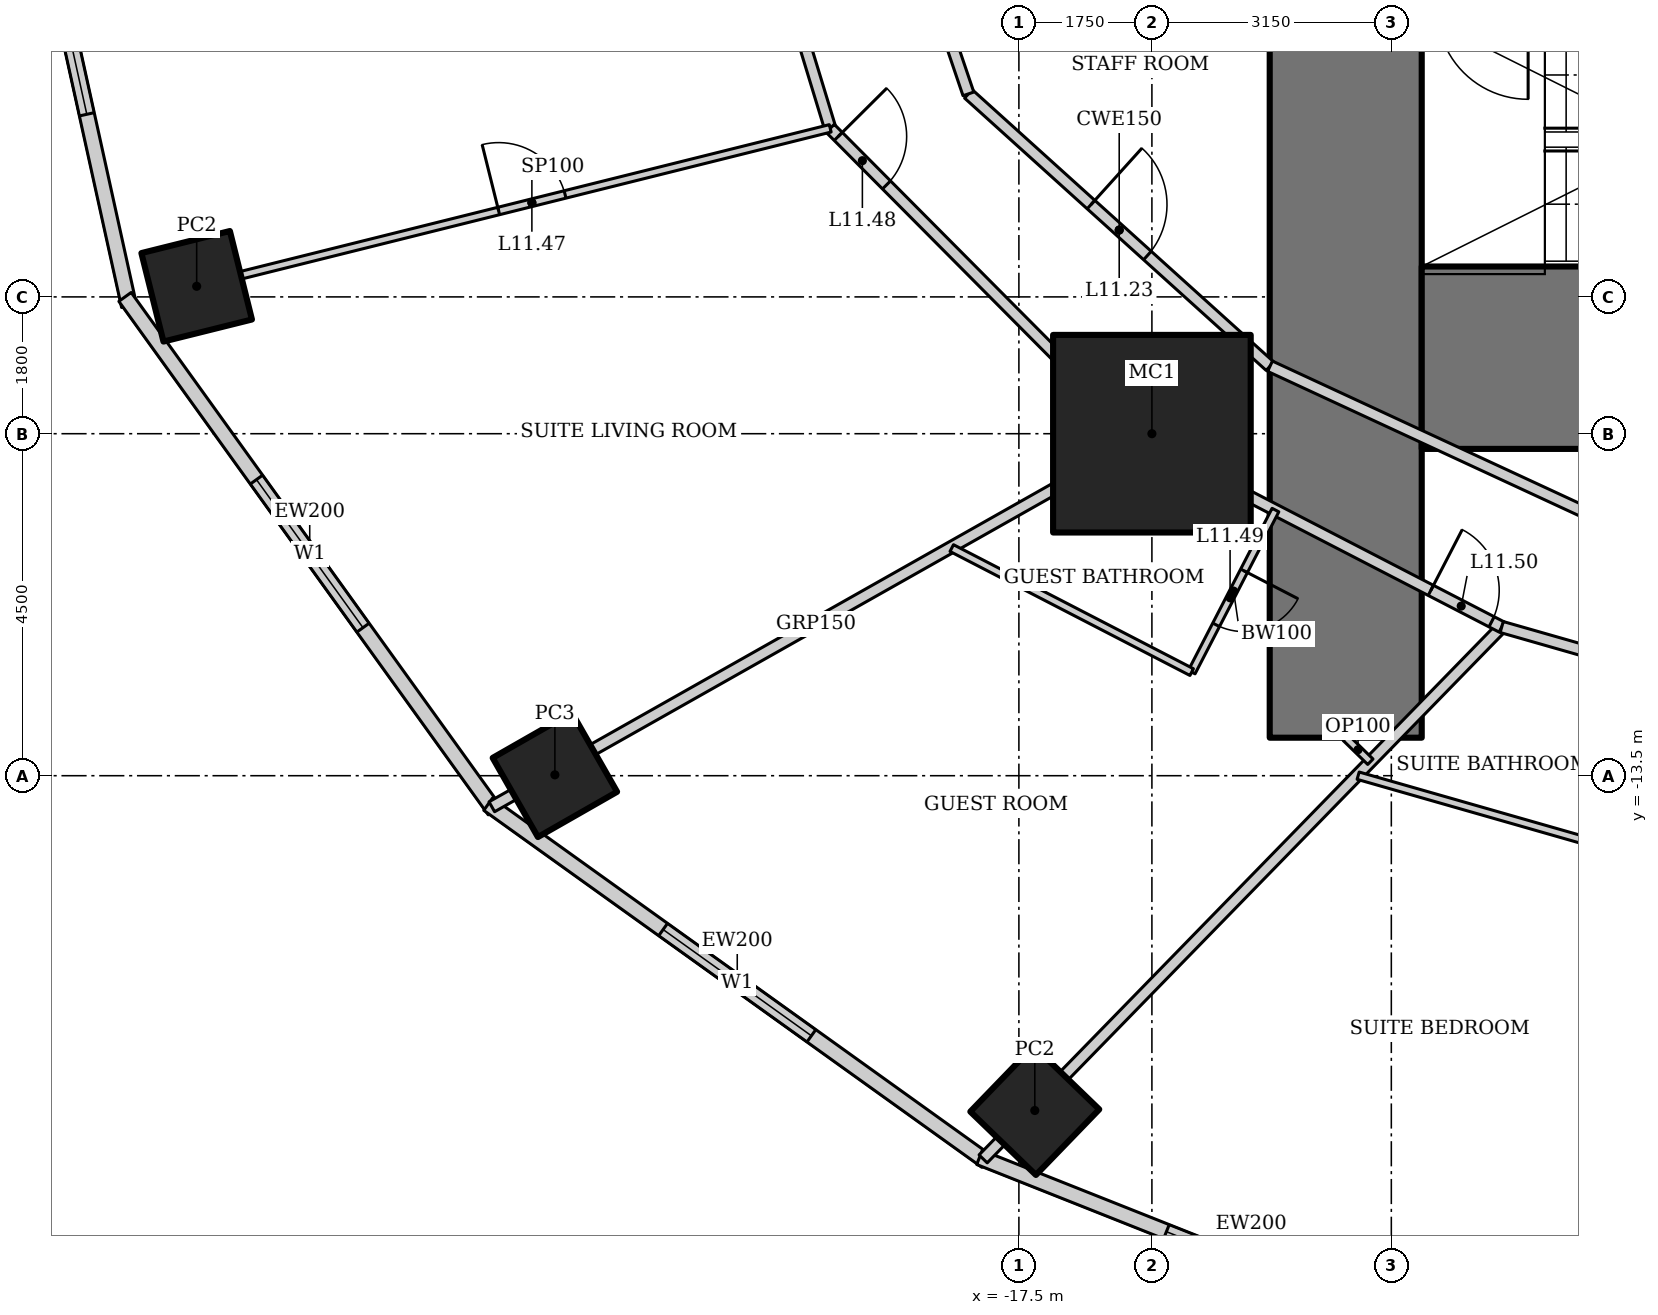
"""IFC4 building model, lengths in metres.
Left out: names, types, materials, properties, quantities, classifications, styles, units other than length and angle.
Written with IfcOpenShell. Run it as: python <this file> out.ifc"""

import sys

from ifc_helpers import new_model, si_unit, direction, frame, frame_2d, origin, origin_2d, place, context, subcontext, project, spatial, rectangle, hollow_rectangle, extrude, element, fill, save


model = new_model("IFC4")
c1 = context("Model", 3, precision=1e-05, world=origin(), true_north=direction((0.0, 1.0)))
c2 = subcontext(c1, "Body", "Model", "MODEL_VIEW")
j1 = project(units=[si_unit("LENGTHUNIT", "METRE"), si_unit("PLANEANGLEUNIT", "RADIAN")], contexts=[c1])
p1 = place(None, origin())
s1 = spatial("IfcSite", under=j1, at=p1, CompositionType="ELEMENT")
p2 = place(p1, origin())
s2 = spatial("IfcBuilding", under=s1, at=p2, CompositionType="ELEMENT")
p3 = place(p2, frame((0.0, 0.0, 55.0)))
s3 = spatial("IfcBuildingStorey", under=s2, at=p3, CompositionType="ELEMENT", Elevation=55.0)
p4 = place(p3, frame((-15.75, -9.0, 0.0), z_axis=(0.0, 0.0, 1.0), x_axis=(1.0, 0.0, 0.0)))
e1 = element("IfcColumn", 1, at=p4, inside=s3, PredefinedType="COLUMN", context=c2, shape_type="SweptSolid", body=[
    extrude(hollow_rectangle(XDim=2.6, YDim=2.6, WallThickness=0.13, at=origin_2d()), origin(), (0.0, 0.0, 1.0), 3.6),
])
p5 = place(p3, frame((-28.318, -7.06, 0.0), z_axis=(0.0, 0.0, 1.0), x_axis=(0.970295726276, 0.2419218956, 0.0)))
e2 = element("IfcColumn", 2, at=p5, inside=s3, PredefinedType="COLUMN", context=c2, shape_type="SweptSolid", body=[
    extrude(hollow_rectangle(XDim=1.2, YDim=1.2, WallThickness=0.1, at=origin_2d()), origin(), (0.0, 0.0, 1.0), 3.6),
])
p6 = place(p3, frame((-23.605, -13.489, 0.0), z_axis=(0.0, 0.0, 1.0), x_axis=(0.86824298017, 0.496139221777, 0.0)))
e3 = element("IfcColumn", 3, at=p6, inside=s3, PredefinedType="COLUMN", context=c2, shape_type="SweptSolid", body=[
    extrude(hollow_rectangle(XDim=1.2, YDim=1.2, WallThickness=0.12, at=origin_2d()), origin(), (0.0, 0.0, 1.0), 3.6),
])
p7 = place(p3, frame((-17.291, -17.905, 0.0), z_axis=(0.0, 0.0, 1.0), x_axis=(0.694658370459, 0.719339800339, 0.0)))
e4 = element("IfcColumn", 4, at=p7, inside=s3, PredefinedType="COLUMN", context=c2, shape_type="SweptSolid", body=[
    extrude(hollow_rectangle(XDim=1.2, YDim=1.2, WallThickness=0.1, at=origin_2d()), origin(), (0.0, 0.0, 1.0), 3.6),
])
p8 = place(p3, frame((-13.2, 13.0, 0.0), z_axis=(0.0, 0.0, 1.0), x_axis=(0.0, -1.0, 0.0)))
e5 = element("IfcWall", 5, at=p8, inside=s3, PredefinedType="SHEAR", context=c2, shape_type="SweptSolid", body=[
    extrude(rectangle(XDim=26.0, YDim=2.0, at=frame_2d((13.0, 0.0))), origin(), (0.0, 0.0, 1.0), 3.6),
])
p9 = place(p8, frame((12.1, 0.0, 0.0)))
e6 = element("IfcOpeningElement", 6, at=p9, cuts=e5, PredefinedType="OPENING", context=c2, shape_type="SweptSolid", body=[
    extrude(rectangle(XDim=1.8, YDim=2.1, at=frame_2d((0.9, 1.05))), frame((0.0, 1.01, 0.0), z_axis=(0.0, -1.0, 0.0), x_axis=(1.0, 0.0, 0.0)), (0.0, 0.0, 1.0), 2.02),
])
p10 = place(p3, frame((-12.2, -8.0, 0.0), z_axis=(0.0, 0.0, 1.0), x_axis=(1.0, 0.0, 0.0)))
e7 = element("IfcWall", 7, at=p10, inside=s3, PredefinedType="SHEAR", context=c2, shape_type="SweptSolid", body=[
    extrude(rectangle(XDim=24.4, YDim=2.4, at=frame_2d((12.2, 0.0))), origin(), (0.0, 0.0, 1.0), 3.6),
])
p11 = place(p3, frame((-30.835, 0.067, 0.0), z_axis=(0.0, 0.0, 1.0), x_axis=(0.215238065514, -0.976561608478, 0.0)))
e8 = element("IfcWall", 8, at=p11, inside=s3, PredefinedType="SOLIDWALL", context=c2, shape_type="SweptSolid", body=[
    extrude(rectangle(XDim=7.562, YDim=0.2, at=frame_2d((3.781, 0.0))), origin(), (0.0, 0.0, 1.0), 3.45),
])
p12 = place(p11, frame((2.581, 0.0, 0.5)))
e9 = element("IfcOpeningElement", 9, at=p12, cuts=e8, PredefinedType="OPENING", context=c2, shape_type="SweptSolid", body=[
    extrude(rectangle(XDim=2.4, YDim=2.2, at=frame_2d((1.2, 1.1))), frame((0.0, 0.11, 0.0), z_axis=(0.0, -1.0, 0.0), x_axis=(1.0, 0.0, 0.0)), (0.0, 0.0, 1.0), 0.22),
])
p13 = place(p3, frame((-29.26, -7.2, 0.0), z_axis=(0.0, 0.0, 1.0), x_axis=(0.583937613703, -0.811798536155, 0.0)))
e10 = element("IfcWall", 10, at=p13, inside=s3, PredefinedType="SOLIDWALL", context=c2, shape_type="SweptSolid", body=[
    extrude(rectangle(XDim=8.323, YDim=0.2, at=frame_2d((4.162, 0.0))), origin(), (0.0, 0.0, 1.0), 3.45),
])
p14 = place(p13, frame((2.961, 0.0, 0.5)))
e11 = element("IfcOpeningElement", 11, at=p14, cuts=e10, PredefinedType="OPENING", context=c2, shape_type="SweptSolid", body=[
    extrude(rectangle(XDim=2.4, YDim=2.2, at=frame_2d((1.2, 1.1))), frame((0.0, 0.11, 0.0), z_axis=(0.0, -1.0, 0.0), x_axis=(1.0, 0.0, 0.0)), (0.0, 0.0, 1.0), 0.22),
])
p15 = place(p3, frame((-24.482, -13.875, 0.0), z_axis=(0.0, 0.0, 1.0), x_axis=(0.812791321576, -0.582554948112, 0.0)))
e12 = element("IfcWall", 12, at=p15, inside=s3, PredefinedType="SOLIDWALL", context=c2, shape_type="SweptSolid", body=[
    extrude(rectangle(XDim=8.063, YDim=0.2, at=frame_2d((4.032, 0.0))), origin(), (0.0, 0.0, 1.0), 3.45),
])
p16 = place(p15, frame((2.832, 0.0, 0.5)))
e13 = element("IfcOpeningElement", 13, at=p16, cuts=e12, PredefinedType="OPENING", context=c2, shape_type="SweptSolid", body=[
    extrude(rectangle(XDim=2.4, YDim=2.2, at=frame_2d((1.2, 1.1))), frame((0.0, 0.11, 0.0), z_axis=(0.0, -1.0, 0.0), x_axis=(1.0, 0.0, 0.0)), (0.0, 0.0, 1.0), 0.22),
])
p17 = place(p3, frame((-18.018, -18.523, 0.0), z_axis=(0.0, 0.0, 1.0), x_axis=(0.929358351251, -0.369178892895, 0.0)))
e14 = element("IfcWall", 14, at=p17, inside=s3, PredefinedType="SOLIDWALL", context=c2, shape_type="SweptSolid", body=[
    extrude(rectangle(XDim=7.692, YDim=0.2, at=frame_2d((3.846, 0.0))), origin(), (0.0, 0.0, 1.0), 3.45),
])
p18 = place(p17, frame((2.646, 0.0, 0.5)))
e15 = element("IfcOpeningElement", 15, at=p18, cuts=e14, PredefinedType="OPENING", context=c2, shape_type="SweptSolid", body=[
    extrude(rectangle(XDim=2.4, YDim=2.2, at=frame_2d((1.2, 1.1))), frame((0.0, 0.11, 0.0), z_axis=(0.0, -1.0, 0.0), x_axis=(1.0, 0.0, 0.0)), (0.0, 0.0, 1.0), 0.22),
])
p19 = place(p3, frame((-24.435, -13.909, 0.0), z_axis=(0.0, 0.0, 1.0), x_axis=(0.870612006791, 0.491970256856, 0.0)))
e16 = element("IfcWall", 16, at=p19, inside=s3, PredefinedType="PARTITIONING", context=c2, shape_type="SweptSolid", body=[
    extrude(rectangle(XDim=9.802, YDim=0.15, at=frame_2d((4.901, 0.0))), origin(), (0.0, 0.0, 1.0), 2.693),
])
p20 = place(p3, frame((-17.97, -18.542, 0.0), z_axis=(0.0, 0.0, 1.0), x_axis=(0.698095013805, 0.71600513385, 0.0)))
e17 = element("IfcWall", 17, at=p20, inside=s3, PredefinedType="PARTITIONING", context=c2, shape_type="SweptSolid", body=[
    extrude(rectangle(XDim=9.774, YDim=0.15, at=frame_2d((4.887, 0.0))), origin(), (0.0, 0.0, 1.0), 2.528),
])
p21 = place(p3, frame((-21.5, 0.0, 0.0), z_axis=(0.0, 0.0, 1.0), x_axis=(0.291383581394, -0.95660629754, 0.0)))
e18 = element("IfcWall", 18, at=p21, inside=s3, PredefinedType="PARTITIONING", context=c2, shape_type="SweptSolid", body=[
    extrude(rectangle(XDim=5.208, YDim=0.15, at=frame_2d((2.604, 0.0))), origin(), (0.0, 0.0, 1.0), 3.45),
])
p22 = place(p3, frame((-19.982, -4.982, 0.0), z_axis=(0.0, 0.0, 1.0), x_axis=(0.705121546414, -0.709086457904, 0.0)))
e19 = element("IfcWall", 19, at=p22, inside=s3, PredefinedType="PARTITIONING", context=c2, shape_type="SweptSolid", body=[
    extrude(rectangle(XDim=5.788, YDim=0.15, at=frame_2d((2.894, 0.0))), origin(), (0.0, 0.0, 1.0), 3.45),
])
p23 = place(p22, frame((0.15, 0.0, 0.0)))
e20 = element("IfcOpeningElement", 20, at=p23, cuts=e19, PredefinedType="OPENING", context=c2, shape_type="SweptSolid", body=[
    extrude(rectangle(XDim=0.9, YDim=2.1, at=frame_2d((0.45, 1.05))), frame((0.0, 0.085, 0.0), z_axis=(0.0, -1.0, 0.0), x_axis=(1.0, 0.0, 0.0)), (0.0, 0.0, 1.0), 0.17),
])
p24 = place(p3, frame((-15.901, -9.086, 0.0), z_axis=(0.0, 0.0, 1.0), x_axis=(0.888333171507, -0.459199495209, 0.0)))
e21 = element("IfcWall", 21, at=p24, inside=s3, PredefinedType="PARTITIONING", context=c2, shape_type="SweptSolid", body=[
    extrude(rectangle(XDim=5.351, YDim=0.15, at=frame_2d((2.676, 0.0))), origin(), (0.0, 0.0, 1.0), 3.45),
])
p25 = place(p24, frame((4.301, 0.0, 0.0)))
e22 = element("IfcOpeningElement", 22, at=p25, cuts=e21, PredefinedType="OPENING", context=c2, shape_type="SweptSolid", body=[
    extrude(rectangle(XDim=0.9, YDim=2.1, at=frame_2d((0.45, 1.05))), frame((0.0, 0.085, 0.0), z_axis=(0.0, -1.0, 0.0), x_axis=(1.0, 0.0, 0.0)), (0.0, 0.0, 1.0), 0.17),
])
p26 = place(p3, frame((-11.147, -11.544, 0.0), z_axis=(0.0, 0.0, 1.0), x_axis=(0.961464178199, -0.27493023486, 0.0)))
e23 = element("IfcWall", 23, at=p26, inside=s3, PredefinedType="PARTITIONING", context=c2, shape_type="SweptSolid", body=[
    extrude(rectangle(XDim=4.78, YDim=0.15, at=frame_2d((2.39, 0.0))), origin(), (0.0, 0.0, 1.0), 3.45),
])
p27 = place(p3, frame((-18.164, -4.529, 0.0), z_axis=(0.0, 0.0, 1.0), x_axis=(0.742194222, -0.670184852731, 0.0)))
e24 = element("IfcWall", 24, at=p27, inside=s3, PredefinedType="PARTITIONING", context=c2, shape_type="SweptSolid", body=[
    extrude(rectangle(XDim=5.347, YDim=0.15, at=frame_2d((2.673, 0.0))), origin(), (0.0, 0.0, 1.0), 3.45),
])
p28 = place(p27, frame((2.173, 0.0, 0.0)))
e25 = element("IfcOpeningElement", 25, at=p28, cuts=e24, PredefinedType="OPENING", context=c2, shape_type="SweptSolid", body=[
    extrude(rectangle(XDim=1.0, YDim=2.1, at=frame_2d((0.5, 1.05))), frame((0.0, 0.085, 0.0), z_axis=(0.0, -1.0, 0.0), x_axis=(1.0, 0.0, 0.0)), (0.0, 0.0, 1.0), 0.17),
])
p29 = place(p3, frame((-14.196, -8.112, 0.0), z_axis=(0.0, 0.0, 1.0), x_axis=(0.907279653965, -0.420527798727, 0.0)))
e26 = element("IfcWall", 26, at=p29, inside=s3, PredefinedType="PARTITIONING", context=c2, shape_type="SweptSolid", body=[
    extrude(rectangle(XDim=4.844, YDim=0.15, at=frame_2d((2.422, 0.0))), origin(), (0.0, 0.0, 1.0), 3.45),
])
p30 = place(p3, frame((-27.833, -6.939, 0.0), z_axis=(0.0, 0.0, 1.0), x_axis=(0.97029673161, 0.24191786339, 0.0)))
e27 = element("IfcWall", 27, at=p30, inside=s3, PredefinedType="PARTITIONING", context=c2, shape_type="SweptSolid", body=[
    extrude(rectangle(XDim=8.091, YDim=0.1, at=frame_2d((4.045, 0.0))), origin(), (0.0, 0.0, 1.0), 2.333),
])
p31 = place(p30, frame((3.595, 0.0, 0.0)))
e28 = element("IfcOpeningElement", 28, at=p31, cuts=e27, PredefinedType="OPENING", context=c2, shape_type="SweptSolid", body=[
    extrude(rectangle(XDim=0.9, YDim=2.1, at=frame_2d((0.45, 1.05))), frame((0.0, 0.06, 0.0), z_axis=(0.0, -1.0, 0.0), x_axis=(1.0, 0.0, 0.0)), (0.0, 0.0, 1.0), 0.12),
])
p32 = place(p3, frame((-14.125, -10.005, 0.0), z_axis=(0.0, 0.0, 1.0), x_axis=(-0.459218106657, -0.888323550582, 0.0)))
e29 = element("IfcWall", 29, at=p32, inside=s3, PredefinedType="PARTITIONING", context=c2, shape_type="SweptSolid", body=[
    extrude(rectangle(XDim=2.4, YDim=0.1, at=frame_2d((1.2, 0.0))), origin(), (0.0, 0.0, 1.0), 3.45),
])
p33 = place(p32, frame((0.9, 0.0, 0.0)))
e30 = element("IfcOpeningElement", 30, at=p33, cuts=e29, PredefinedType="OPENING", context=c2, shape_type="SweptSolid", body=[
    extrude(rectangle(XDim=0.8, YDim=2.1, at=frame_2d((0.4, 1.05))), frame((0.0, 0.06, 0.0), z_axis=(0.0, -1.0, 0.0), x_axis=(1.0, 0.0, 0.0)), (0.0, 0.0, 1.0), 0.12),
])
p34 = place(p3, frame((-15.227, -12.137, 0.0), z_axis=(0.0, 0.0, 1.0), x_axis=(-0.888342312029, 0.459181812204, 0.0)))
e31 = element("IfcWall", 31, at=p34, inside=s3, PredefinedType="PARTITIONING", context=c2, shape_type="SweptSolid", body=[
    extrude(rectangle(XDim=3.554, YDim=0.1, at=frame_2d((1.777, 0.0))), origin(), (0.0, 0.0, 1.0), 3.45),
])
p35 = place(p3, frame((-9.885, -14.401, 0.0), z_axis=(0.0, 0.0, 1.0), x_axis=(-0.961456470712, 0.274957187441, 0.0)))
e32 = element("IfcWall", 32, at=p35, inside=s3, PredefinedType="PARTITIONING", context=c2, shape_type="SweptSolid", body=[
    extrude(rectangle(XDim=3.278, YDim=0.1, at=frame_2d((1.639, 0.0))), origin(), (0.0, 0.0, 1.0), 3.45),
])
p36 = place(p3, frame((-10.236, -20.088, 0.0), z_axis=(0.0, 0.0, 1.0), x_axis=(0.45398797485, 0.891007810679, 0.0)))
e33 = element("IfcWall", 33, at=p36, inside=s3, PredefinedType="PARTITIONING", context=c2, shape_type="SweptSolid", body=[
    extrude(rectangle(XDim=8.115, YDim=0.1, at=frame_2d((4.058, 0.0))), origin(), (0.0, 0.0, 1.0), 2.528),
])
p37 = place(p36, frame((3.607, 0.0, 0.0)))
e34 = element("IfcOpeningElement", 34, at=p37, cuts=e33, PredefinedType="OPENING", context=c2, shape_type="SweptSolid", body=[
    extrude(rectangle(XDim=0.9, YDim=2.1, at=frame_2d((0.45, 1.05))), frame((0.0, 0.06, 0.0), z_axis=(0.0, -1.0, 0.0), x_axis=(1.0, 0.0, 0.0)), (0.0, 0.0, 1.0), 0.12),
])
p38 = place(p3, frame((-13.2, -13.0, 0.0), z_axis=(0.0, 0.0, 1.0), x_axis=(0.715946243145, -0.698155410296, 0.0)))
e35 = element("IfcWall", 35, at=p38, inside=s3, PredefinedType="PARTITIONING", context=c2, shape_type="SweptSolid", body=[
    extrude(rectangle(XDim=0.453, YDim=0.1, at=frame_2d((0.227, 0.0))), origin(), (0.0, 0.0, 1.0), 3.45),
])
p39 = place(p3, frame((-18.908, -2.335, 0.0), z_axis=(0.0, 0.0, 1.0), x_axis=(0.321124194945, -0.947037090837, 0.0)))
e36 = element("IfcWall", 36, at=p39, inside=s3, PredefinedType="PARTITIONING", context=c2, shape_type="SweptSolid", body=[
    extrude(rectangle(XDim=2.317, YDim=0.15, at=frame_2d((1.158, 0.0))), origin(), (0.0, 0.0, 1.0), 3.45),
])
p40 = place(p12, origin())
e37 = element("IfcWindow", 37, at=p40, inside=s3, PartitioningType="SINGLE_PANEL", PredefinedType="WINDOW", context=c2, shape_type="SweptSolid", body=[
    extrude(rectangle(XDim=2.4, YDim=2.2, at=frame_2d((1.2, 1.1))), frame((0.0, 0.03, 0.0), z_axis=(0.0, -1.0, 0.0), x_axis=(1.0, 0.0, 0.0)), (0.0, 0.0, 1.0), 0.06),
])
fill(e9, e37)
p41 = place(p14, origin())
e38 = element("IfcWindow", 38, at=p41, inside=s3, PartitioningType="SINGLE_PANEL", PredefinedType="WINDOW", context=c2, shape_type="SweptSolid", body=[
    extrude(rectangle(XDim=2.4, YDim=2.2, at=frame_2d((1.2, 1.1))), frame((0.0, 0.03, 0.0), z_axis=(0.0, -1.0, 0.0), x_axis=(1.0, 0.0, 0.0)), (0.0, 0.0, 1.0), 0.06),
])
fill(e11, e38)
p42 = place(p16, origin())
e39 = element("IfcWindow", 39, at=p42, inside=s3, PartitioningType="SINGLE_PANEL", PredefinedType="WINDOW", context=c2, shape_type="SweptSolid", body=[
    extrude(rectangle(XDim=2.4, YDim=2.2, at=frame_2d((1.2, 1.1))), frame((0.0, 0.03, 0.0), z_axis=(0.0, -1.0, 0.0), x_axis=(1.0, 0.0, 0.0)), (0.0, 0.0, 1.0), 0.06),
])
fill(e13, e39)
p43 = place(p18, origin())
e40 = element("IfcWindow", 40, at=p43, inside=s3, PartitioningType="SINGLE_PANEL", PredefinedType="WINDOW", context=c2, shape_type="SweptSolid", body=[
    extrude(rectangle(XDim=2.4, YDim=2.2, at=frame_2d((1.2, 1.1))), frame((0.0, 0.03, 0.0), z_axis=(0.0, -1.0, 0.0), x_axis=(1.0, 0.0, 0.0)), (0.0, 0.0, 1.0), 0.06),
])
fill(e15, e40)
p44 = place(p28, origin())
e41 = element("IfcDoor", 41, at=p44, inside=s3, OperationType="SINGLE_SWING_LEFT", PredefinedType="DOOR", context=c2, shape_type="SweptSolid", body=[
    extrude(rectangle(XDim=1.0, YDim=2.1, at=frame_2d((0.5, 1.05))), frame((0.0, 0.025, 0.0), z_axis=(0.0, -1.0, 0.0), x_axis=(1.0, 0.0, 0.0)), (0.0, 0.0, 1.0), 0.05),
])
fill(e25, e41)
p45 = place(p31, origin())
e42 = element("IfcDoor", 42, at=p45, inside=s3, OperationType="SINGLE_SWING_LEFT", PredefinedType="DOOR", context=c2, shape_type="SweptSolid", body=[
    extrude(rectangle(XDim=0.9, YDim=2.1, at=frame_2d((0.45, 1.05))), frame((0.0, 0.025, 0.0), z_axis=(0.0, -1.0, 0.0), x_axis=(1.0, 0.0, 0.0)), (0.0, 0.0, 1.0), 0.05),
])
fill(e28, e42)
p46 = place(p23, origin())
e43 = element("IfcDoor", 43, at=p46, inside=s3, OperationType="SINGLE_SWING_LEFT", PredefinedType="DOOR", context=c2, shape_type="SweptSolid", body=[
    extrude(rectangle(XDim=0.9, YDim=2.1, at=frame_2d((0.45, 1.05))), frame((0.0, 0.025, 0.0), z_axis=(0.0, -1.0, 0.0), x_axis=(1.0, 0.0, 0.0)), (0.0, 0.0, 1.0), 0.05),
])
fill(e20, e43)
p47 = place(p33, origin())
e44 = element("IfcDoor", 44, at=p47, inside=s3, OperationType="SINGLE_SWING_LEFT", PredefinedType="DOOR", context=c2, shape_type="SweptSolid", body=[
    extrude(rectangle(XDim=0.8, YDim=2.1, at=frame_2d((0.4, 1.05))), frame((0.0, 0.025, 0.0), z_axis=(0.0, -1.0, 0.0), x_axis=(1.0, 0.0, 0.0)), (0.0, 0.0, 1.0), 0.05),
])
fill(e30, e44)
p48 = place(p25, origin())
e45 = element("IfcDoor", 45, at=p48, inside=s3, OperationType="SINGLE_SWING_LEFT", PredefinedType="DOOR", context=c2, shape_type="SweptSolid", body=[
    extrude(rectangle(XDim=0.9, YDim=2.1, at=frame_2d((0.45, 1.05))), frame((0.0, 0.025, 0.0), z_axis=(0.0, -1.0, 0.0), x_axis=(1.0, 0.0, 0.0)), (0.0, 0.0, 1.0), 0.05),
])
fill(e22, e45)
save(model, sys.argv[1])
